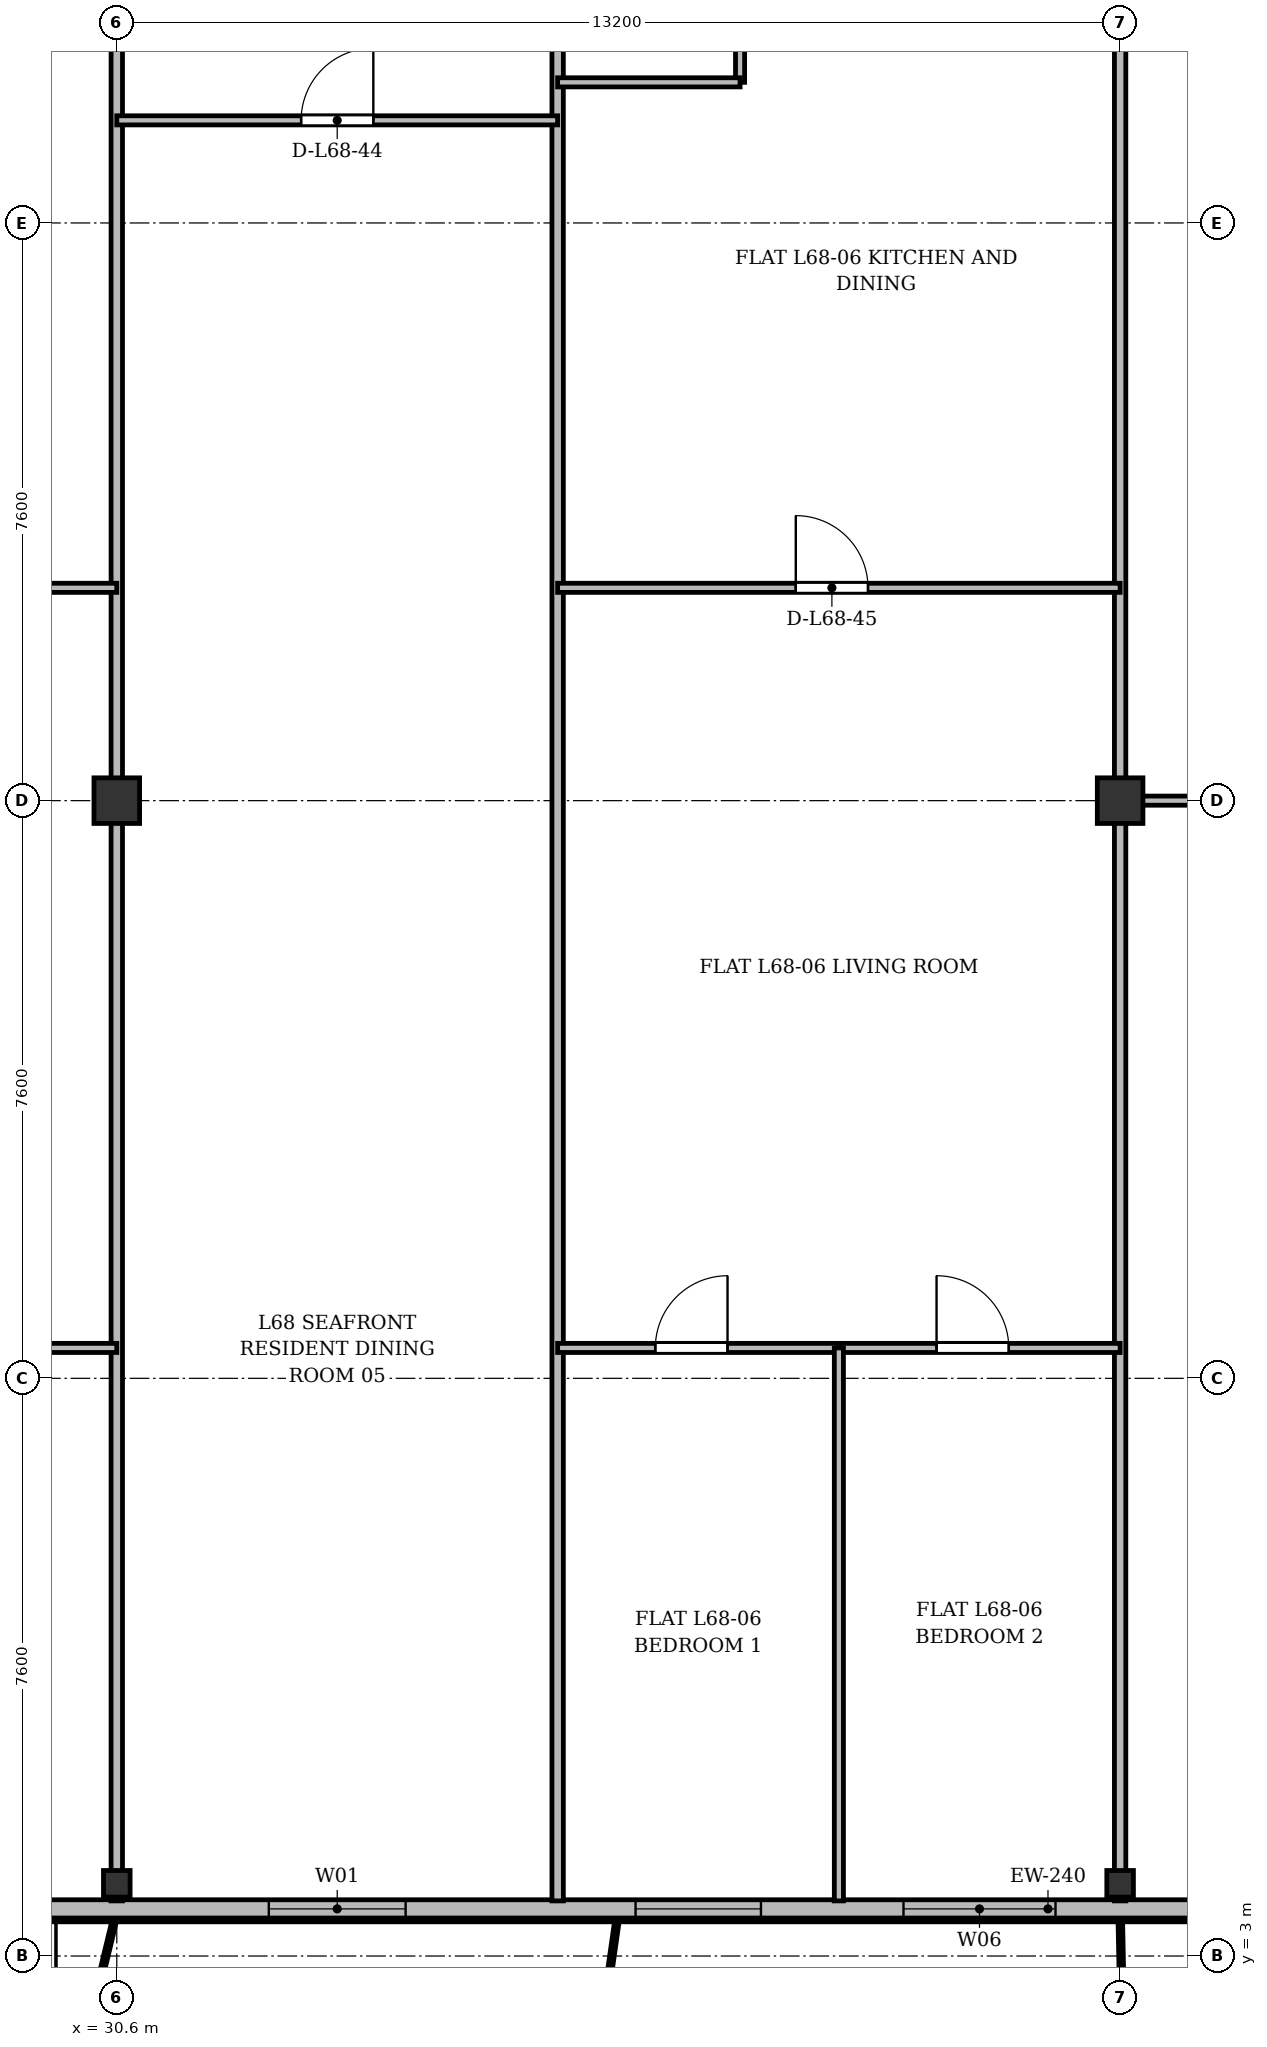
"""IFC4 building model, lengths in metres.
Left out: names, types, materials, properties, quantities, classifications, styles, units other than length and angle.
Written with IfcOpenShell. Run it as: python <this file> out.ifc"""

import sys

from ifc_helpers import new_model, si_unit, direction, frame, frame_2d, origin, origin_2d, place, context, subcontext, project, spatial, rectangle, i_section, extrude, source, transform, mapped, element, fill, save


model = new_model("IFC4")
c1 = context("Model", 3, precision=1e-05, world=origin(), true_north=direction((0.0, 1.0)))
c2 = subcontext(c1, "Body", "Model", "MODEL_VIEW")
j1 = project(units=[si_unit("LENGTHUNIT", "METRE"), si_unit("PLANEANGLEUNIT", "RADIAN")], contexts=[c1])
p1 = place(None, origin())
s1 = spatial("IfcSite", under=j1, at=p1, CompositionType="ELEMENT")
p2 = place(p1, origin())
s2 = spatial("IfcBuilding", under=s1, at=p2, CompositionType="ELEMENT")
p3 = place(p2, frame((0.0, 0.0, 263.1)))
s3 = spatial("IfcBuildingStorey", under=s2, at=p3, CompositionType="ELEMENT", Elevation=263.1)
m1 = source(origin(), c2, "Body", "SweptSolid", [
    extrude(i_section(OverallWidth=0.35, OverallDepth=0.35, WebThickness=0.018, FlangeThickness=0.028, at=origin_2d()), origin(), (0.0, 0.0, 1.0), 3.6),
])
p4 = place(p3, frame((30.6, 3.95, 0.0), z_axis=(0.0, 0.0, 1.0), x_axis=(1.0, 0.0, 0.0)))
e1 = element("IfcColumn", 1, at=p4, inside=s3, PredefinedType="COLUMN", context=c2, shape_type="MappedRepresentation", body=[
    mapped(m1, transform((0.0, 0.0, 0.0), x_axis=(1.0, 0.0, 0.0), y_axis=(0.0, 1.0, 0.0), z_axis=(0.0, 0.0, 1.0), scale=1.0)),
])
m2 = source(origin(), c2, "Body", "SweptSolid", [
    extrude(rectangle(XDim=0.6, YDim=0.6, at=origin_2d()), origin(), (0.0, 0.0, 1.0), 3.6),
])
p5 = place(p3, frame((30.6, 18.2, 0.0), z_axis=(0.0, 0.0, 1.0), x_axis=(1.0, 0.0, 0.0)))
e2 = element("IfcColumn", 2, at=p5, inside=s3, PredefinedType="COLUMN", context=c2, shape_type="MappedRepresentation", body=[
    mapped(m2, transform((0.0, 0.0, 0.0), x_axis=(1.0, 0.0, 0.0), y_axis=(0.0, 1.0, 0.0), z_axis=(0.0, 0.0, 1.0), scale=1.0)),
])
p6 = place(p3, frame((43.8, 3.95, 0.0), z_axis=(0.0, 0.0, 1.0), x_axis=(1.0, 0.0, 0.0)))
e3 = element("IfcColumn", 3, at=p6, inside=s3, PredefinedType="COLUMN", context=c2, shape_type="MappedRepresentation", body=[
    mapped(m1, transform((0.0, 0.0, 0.0), x_axis=(1.0, 0.0, 0.0), y_axis=(0.0, 1.0, 0.0), z_axis=(0.0, 0.0, 1.0), scale=1.0)),
])
p7 = place(p3, frame((43.8, 18.2, 0.0), z_axis=(0.0, 0.0, 1.0), x_axis=(1.0, 0.0, 0.0)))
e4 = element("IfcColumn", 4, at=p7, inside=s3, PredefinedType="COLUMN", context=c2, shape_type="MappedRepresentation", body=[
    mapped(m2, transform((0.0, 0.0, 0.0), x_axis=(1.0, 0.0, 0.0), y_axis=(0.0, 1.0, 0.0), z_axis=(0.0, 0.0, 1.0), scale=1.0)),
])
p8 = place(p3, frame((63.2, 3.62, 0.0), z_axis=(0.0, 0.0, 1.0), x_axis=(-1.0, 0.0, 0.0)))
e5 = element("IfcWall", 5, at=p8, inside=s3, PredefinedType="SOLIDWALL", context=c2, shape_type="SweptSolid", body=[
    extrude(rectangle(XDim=52.0, YDim=0.24, at=frame_2d((26.0, 0.0))), origin(), (0.0, 0.0, 1.0), 3.37),
])
p9 = place(p8, frame((0.345, 0.0, 0.9)))
e6 = element("IfcOpeningElement", 6, at=p9, cuts=e5, PredefinedType="OPENING", context=c2, shape_type="SweptSolid", body=[
    extrude(rectangle(XDim=1.2, YDim=1.65, at=frame_2d((0.6, 0.825))), frame((0.0, 0.13, 0.0), z_axis=(0.0, -1.0, 0.0), x_axis=(1.0, 0.0, 0.0)), (0.0, 0.0, 1.0), 0.26),
])
p10 = place(p8, frame((2.225, 0.0, 0.9)))
e7 = element("IfcOpeningElement", 7, at=p10, cuts=e5, PredefinedType="OPENING", context=c2, shape_type="SweptSolid", body=[
    extrude(rectangle(XDim=1.65, YDim=1.85, at=frame_2d((0.825, 0.925))), frame((0.0, 0.13, 0.0), z_axis=(0.0, -1.0, 0.0), x_axis=(1.0, 0.0, 0.0)), (0.0, 0.0, 1.0), 0.26),
])
p11 = place(p8, frame((5.42, 0.0, 0.0)))
e8 = element("IfcOpeningElement", 8, at=p11, cuts=e5, PredefinedType="OPENING", context=c2, shape_type="SweptSolid", body=[
    extrude(rectangle(XDim=1.2, YDim=2.2, at=frame_2d((0.6, 1.1))), frame((0.0, 0.13, 0.0), z_axis=(0.0, -1.0, 0.0), x_axis=(1.0, 0.0, 0.0)), (0.0, 0.0, 1.0), 0.26),
])
p12 = place(p8, frame((8.4, 0.0, 0.9)))
e9 = element("IfcOpeningElement", 9, at=p12, cuts=e5, PredefinedType="OPENING", context=c2, shape_type="SweptSolid", body=[
    extrude(rectangle(XDim=2.2, YDim=1.8, at=frame_2d((1.1, 0.9))), frame((0.0, 0.13, 0.0), z_axis=(0.0, -1.0, 0.0), x_axis=(1.0, 0.0, 0.0)), (0.0, 0.0, 1.0), 0.26),
])
p13 = place(p8, frame((15.05, 0.0, 0.9)))
e10 = element("IfcOpeningElement", 10, at=p13, cuts=e5, PredefinedType="OPENING", context=c2, shape_type="SweptSolid", body=[
    extrude(rectangle(XDim=1.5, YDim=1.75, at=frame_2d((0.75, 0.875))), frame((0.0, 0.13, 0.0), z_axis=(0.0, -1.0, 0.0), x_axis=(1.0, 0.0, 0.0)), (0.0, 0.0, 1.0), 0.26),
])
p14 = place(p8, frame((20.25, 0.0, 0.9)))
e11 = element("IfcOpeningElement", 11, at=p14, cuts=e5, PredefinedType="OPENING", context=c2, shape_type="SweptSolid", body=[
    extrude(rectangle(XDim=2.0, YDim=1.95, at=frame_2d((1.0, 0.975))), frame((0.0, 0.13, 0.0), z_axis=(0.0, -1.0, 0.0), x_axis=(1.0, 0.0, 0.0)), (0.0, 0.0, 1.0), 0.26),
])
p15 = place(p8, frame((24.125, 0.0, 0.9)))
e12 = element("IfcOpeningElement", 12, at=p15, cuts=e5, PredefinedType="OPENING", context=c2, shape_type="SweptSolid", body=[
    extrude(rectangle(XDim=1.65, YDim=1.85, at=frame_2d((0.825, 0.925))), frame((0.0, 0.13, 0.0), z_axis=(0.0, -1.0, 0.0), x_axis=(1.0, 0.0, 0.0)), (0.0, 0.0, 1.0), 0.26),
])
p16 = place(p8, frame((28.8, 0.0, 0.9)))
e13 = element("IfcOpeningElement", 13, at=p16, cuts=e5, PredefinedType="OPENING", context=c2, shape_type="SweptSolid", body=[
    extrude(rectangle(XDim=1.8, YDim=1.8, at=frame_2d((0.9, 0.9))), frame((0.0, 0.13, 0.0), z_axis=(0.0, -1.0, 0.0), x_axis=(1.0, 0.0, 0.0)), (0.0, 0.0, 1.0), 0.26),
])
p17 = place(p8, frame((34.078, 0.0, 0.0)))
e14 = element("IfcOpeningElement", 14, at=p17, cuts=e5, PredefinedType="OPENING", context=c2, shape_type="SweptSolid", body=[
    extrude(rectangle(XDim=1.2, YDim=2.2, at=frame_2d((0.6, 1.1))), frame((0.0, 0.13, 0.0), z_axis=(0.0, -1.0, 0.0), x_axis=(1.0, 0.0, 0.0)), (0.0, 0.0, 1.0), 0.26),
])
p18 = place(p8, frame((37.25, 0.0, 0.9)))
e15 = element("IfcOpeningElement", 15, at=p18, cuts=e5, PredefinedType="OPENING", context=c2, shape_type="SweptSolid", body=[
    extrude(rectangle(XDim=1.5, YDim=1.75, at=frame_2d((0.75, 0.875))), frame((0.0, 0.13, 0.0), z_axis=(0.0, -1.0, 0.0), x_axis=(1.0, 0.0, 0.0)), (0.0, 0.0, 1.0), 0.26),
])
p19 = place(p8, frame((40.9, 0.0, 0.9)))
e16 = element("IfcOpeningElement", 16, at=p19, cuts=e5, PredefinedType="OPENING", context=c2, shape_type="SweptSolid", body=[
    extrude(rectangle(XDim=2.0, YDim=1.95, at=frame_2d((1.0, 0.975))), frame((0.0, 0.13, 0.0), z_axis=(0.0, -1.0, 0.0), x_axis=(1.0, 0.0, 0.0)), (0.0, 0.0, 1.0), 0.26),
])
p20 = place(p8, frame((44.19, 0.0, 0.9)))
e17 = element("IfcOpeningElement", 17, at=p20, cuts=e5, PredefinedType="OPENING", context=c2, shape_type="SweptSolid", body=[
    extrude(rectangle(XDim=1.65, YDim=1.85, at=frame_2d((0.825, 0.925))), frame((0.0, 0.13, 0.0), z_axis=(0.0, -1.0, 0.0), x_axis=(1.0, 0.0, 0.0)), (0.0, 0.0, 1.0), 0.26),
])
p21 = place(p8, frame((49.855, 0.0, 0.9)))
e18 = element("IfcOpeningElement", 18, at=p21, cuts=e5, PredefinedType="OPENING", context=c2, shape_type="SweptSolid", body=[
    extrude(rectangle(XDim=1.8, YDim=1.8, at=frame_2d((0.9, 0.9))), frame((0.0, 0.13, 0.0), z_axis=(0.0, -1.0, 0.0), x_axis=(1.0, 0.0, 0.0)), (0.0, 0.0, 1.0), 0.26),
])
p22 = place(p3, frame((30.6, 3.725, 0.0), z_axis=(0.0, 0.0, 1.0), x_axis=(0.0, 1.0, 0.0)))
e19 = element("IfcWall", 19, at=p22, inside=s3, PredefinedType="PARTITIONING", context=c2, shape_type="SweptSolid", body=[
    extrude(rectangle(XDim=27.275, YDim=0.15, at=frame_2d((13.637, 0.0))), origin(), (0.0, 0.0, 1.0), 2.87),
])
p23 = place(p3, frame((36.4, 3.725, 0.0), z_axis=(0.0, 0.0, 1.0), x_axis=(0.0, 1.0, 0.0)))
e20 = element("IfcWall", 20, at=p23, inside=s3, PredefinedType="PARTITIONING", context=c2, shape_type="SweptSolid", body=[
    extrude(rectangle(XDim=27.275, YDim=0.15, at=frame_2d((13.637, 0.0))), origin(), (0.0, 0.0, 1.0), 2.92),
])
p24 = place(p3, frame((43.8, 3.725, 0.0), z_axis=(0.0, 0.0, 1.0), x_axis=(0.0, 1.0, 0.0)))
e21 = element("IfcWall", 21, at=p24, inside=s3, PredefinedType="PARTITIONING", context=c2, shape_type="SweptSolid", body=[
    extrude(rectangle(XDim=27.275, YDim=0.15, at=frame_2d((13.637, 0.0))), origin(), (0.0, 0.0, 1.0), 2.87),
])
p25 = place(p3, frame((23.4, 21.0, 0.0), z_axis=(0.0, 0.0, 1.0), x_axis=(1.0, 0.0, 0.0)))
e22 = element("IfcWall", 22, at=p25, inside=s3, PredefinedType="PARTITIONING", context=c2, shape_type="SweptSolid", body=[
    extrude(rectangle(XDim=7.2, YDim=0.12, at=frame_2d((3.6, 0.0))), origin(), (0.0, 0.0, 1.0), 2.87),
])
p26 = place(p25, frame((3.125, 0.0, 0.0)))
e23 = element("IfcOpeningElement", 23, at=p26, cuts=e22, PredefinedType="OPENING", context=c2, shape_type="SweptSolid", body=[
    extrude(rectangle(XDim=0.95, YDim=2.15, at=frame_2d((0.475, 1.075))), frame((0.0, 0.07, 0.0), z_axis=(0.0, -1.0, 0.0), x_axis=(1.0, 0.0, 0.0)), (0.0, 0.0, 1.0), 0.14),
])
p27 = place(p3, frame((27.0, 11.0, 0.0), z_axis=(0.0, 0.0, 1.0), x_axis=(1.0, 0.0, 0.0)))
e24 = element("IfcWall", 24, at=p27, inside=s3, PredefinedType="PARTITIONING", context=c2, shape_type="SweptSolid", body=[
    extrude(rectangle(XDim=3.6, YDim=0.12, at=frame_2d((1.8, 0.0))), origin(), (0.0, 0.0, 1.0), 2.87),
])
p28 = place(p27, frame((1.325, 0.0, 0.0)))
e25 = element("IfcOpeningElement", 25, at=p28, cuts=e24, PredefinedType="OPENING", context=c2, shape_type="SweptSolid", body=[
    extrude(rectangle(XDim=0.95, YDim=2.15, at=frame_2d((0.475, 1.075))), frame((0.0, 0.07, 0.0), z_axis=(0.0, -1.0, 0.0), x_axis=(1.0, 0.0, 0.0)), (0.0, 0.0, 1.0), 0.14),
])
p29 = place(p3, frame((30.6, 27.15, 0.0), z_axis=(0.0, 0.0, 1.0), x_axis=(1.0, 0.0, 0.0)))
e26 = element("IfcWall", 26, at=p29, inside=s3, PredefinedType="PARTITIONING", context=c2, shape_type="SweptSolid", body=[
    extrude(rectangle(XDim=5.8, YDim=0.12, at=frame_2d((2.9, 0.0))), origin(), (0.0, 0.0, 1.0), 2.87),
])
p30 = place(p29, frame((2.425, 0.0, 0.0)))
e27 = element("IfcOpeningElement", 27, at=p30, cuts=e26, PredefinedType="OPENING", context=c2, shape_type="SweptSolid", body=[
    extrude(rectangle(XDim=0.95, YDim=2.15, at=frame_2d((0.475, 1.075))), frame((0.0, 0.07, 0.0), z_axis=(0.0, -1.0, 0.0), x_axis=(1.0, 0.0, 0.0)), (0.0, 0.0, 1.0), 0.14),
])
p31 = place(p3, frame((36.4, 21.0, 0.0), z_axis=(0.0, 0.0, 1.0), x_axis=(1.0, 0.0, 0.0)))
e28 = element("IfcWall", 28, at=p31, inside=s3, PredefinedType="PARTITIONING", context=c2, shape_type="SweptSolid", body=[
    extrude(rectangle(XDim=7.4, YDim=0.12, at=frame_2d((3.7, 0.0))), origin(), (0.0, 0.0, 1.0), 2.87),
])
p32 = place(p31, frame((3.133, 0.0, 0.0)))
e29 = element("IfcOpeningElement", 29, at=p32, cuts=e28, PredefinedType="OPENING", context=c2, shape_type="SweptSolid", body=[
    extrude(rectangle(XDim=0.95, YDim=2.15, at=frame_2d((0.475, 1.075))), frame((0.0, 0.07, 0.0), z_axis=(0.0, -1.0, 0.0), x_axis=(1.0, 0.0, 0.0)), (0.0, 0.0, 1.0), 0.14),
])
p33 = place(p3, frame((38.8, 27.65, 0.0), z_axis=(0.0, 0.0, 1.0), x_axis=(0.0, 1.0, 0.0)))
e30 = element("IfcWall", 30, at=p33, inside=s3, PredefinedType="PARTITIONING", context=c2, shape_type="SweptSolid", body=[
    extrude(rectangle(XDim=3.35, YDim=0.12, at=frame_2d((1.675, 0.0))), origin(), (0.0, 0.0, 1.0), 3.37),
])
p34 = place(p33, frame((0.8, 0.0, 0.0)))
e31 = element("IfcOpeningElement", 31, at=p34, cuts=e30, PredefinedType="OPENING", context=c2, shape_type="SweptSolid", body=[
    extrude(rectangle(XDim=0.85, YDim=2.1, at=frame_2d((0.425, 1.05))), frame((0.0, 0.07, 0.0), z_axis=(0.0, -1.0, 0.0), x_axis=(1.0, 0.0, 0.0)), (0.0, 0.0, 1.0), 0.14),
])
p35 = place(p3, frame((36.4, 27.65, 0.0), z_axis=(0.0, 0.0, 1.0), x_axis=(1.0, 0.0, 0.0)))
e32 = element("IfcWall", 32, at=p35, inside=s3, PredefinedType="PARTITIONING", context=c2, shape_type="SweptSolid", body=[
    extrude(rectangle(XDim=2.4, YDim=0.12, at=frame_2d((1.2, 0.0))), origin(), (0.0, 0.0, 1.0), 3.37),
])
p36 = place(p3, frame((36.4, 11.0, 0.0), z_axis=(0.0, 0.0, 1.0), x_axis=(1.0, 0.0, 0.0)))
e33 = element("IfcWall", 33, at=p36, inside=s3, PredefinedType="PARTITIONING", context=c2, shape_type="SweptSolid", body=[
    extrude(rectangle(XDim=3.7, YDim=0.12, at=frame_2d((1.85, 0.0))), origin(), (0.0, 0.0, 1.0), 3.37),
])
p37 = place(p36, frame((1.285, 0.0, 0.0)))
e34 = element("IfcOpeningElement", 34, at=p37, cuts=e33, PredefinedType="OPENING", context=c2, shape_type="SweptSolid", body=[
    extrude(rectangle(XDim=0.95, YDim=2.15, at=frame_2d((0.475, 1.075))), frame((0.0, 0.07, 0.0), z_axis=(0.0, -1.0, 0.0), x_axis=(1.0, 0.0, 0.0)), (0.0, 0.0, 1.0), 0.14),
])
p38 = place(p3, frame((40.1, 11.0, 0.0), z_axis=(0.0, 0.0, 1.0), x_axis=(1.0, 0.0, 0.0)))
e35 = element("IfcWall", 35, at=p38, inside=s3, PredefinedType="PARTITIONING", context=c2, shape_type="SweptSolid", body=[
    extrude(rectangle(XDim=3.7, YDim=0.12, at=frame_2d((1.85, 0.0))), origin(), (0.0, 0.0, 1.0), 2.87),
])
p39 = place(p38, frame((1.285, 0.0, 0.0)))
e36 = element("IfcOpeningElement", 36, at=p39, cuts=e35, PredefinedType="OPENING", context=c2, shape_type="SweptSolid", body=[
    extrude(rectangle(XDim=0.95, YDim=2.15, at=frame_2d((0.475, 1.075))), frame((0.0, 0.07, 0.0), z_axis=(0.0, -1.0, 0.0), x_axis=(1.0, 0.0, 0.0)), (0.0, 0.0, 1.0), 0.14),
])
p40 = place(p3, frame((40.1, 3.725, 0.0), z_axis=(0.0, 0.0, 1.0), x_axis=(0.0, 1.0, 0.0)))
e37 = element("IfcWall", 37, at=p40, inside=s3, PredefinedType="PARTITIONING", context=c2, shape_type="SweptSolid", body=[
    extrude(rectangle(XDim=7.275, YDim=0.12, at=frame_2d((3.637, 0.0))), origin(), (0.0, 0.0, 1.0), 2.92),
])
p41 = place(p3, frame((43.8, 18.2, 0.0), z_axis=(0.0, 0.0, 1.0), x_axis=(1.0, 0.0, 0.0)))
e38 = element("IfcWall", 38, at=p41, inside=s3, PredefinedType="PARTITIONING", context=c2, shape_type="SweptSolid", body=[
    extrude(rectangle(XDim=7.2, YDim=0.12, at=frame_2d((3.6, 0.0))), origin(), (0.0, 0.0, 1.0), 2.92),
])
p42 = place(p41, frame((3.125, 0.0, 0.0)))
e39 = element("IfcOpeningElement", 39, at=p42, cuts=e38, PredefinedType="OPENING", context=c2, shape_type="SweptSolid", body=[
    extrude(rectangle(XDim=0.95, YDim=2.15, at=frame_2d((0.475, 1.075))), frame((0.0, 0.07, 0.0), z_axis=(0.0, -1.0, 0.0), x_axis=(1.0, 0.0, 0.0)), (0.0, 0.0, 1.0), 0.14),
])
m3 = source(origin(), c2, "Body", "SweptSolid", [
    extrude(rectangle(XDim=2.0, YDim=1.95, at=frame_2d((1.0, 0.975))), frame((0.0, 0.03, 0.0), z_axis=(0.0, -1.0, 0.0), x_axis=(1.0, 0.0, 0.0)), (0.0, 0.0, 1.0), 0.06),
])
p43 = place(p14, origin())
e40 = element("IfcWindow", 40, at=p43, inside=s3, PartitioningType="SINGLE_PANEL", PredefinedType="WINDOW", context=c2, shape_type="MappedRepresentation", body=[
    mapped(m3, transform((0.0, 0.0, 0.0), x_axis=(1.0, 0.0, 0.0), y_axis=(0.0, 1.0, 0.0), z_axis=(0.0, 0.0, 1.0), scale=1.0)),
])
fill(e11, e40)
m4 = source(origin(), c2, "Body", "SweptSolid", [
    extrude(rectangle(XDim=1.65, YDim=1.85, at=frame_2d((0.825, 0.925))), frame((0.0, 0.03, 0.0), z_axis=(0.0, -1.0, 0.0), x_axis=(1.0, 0.0, 0.0)), (0.0, 0.0, 1.0), 0.06),
])
p44 = place(p15, origin())
e41 = element("IfcWindow", 41, at=p44, inside=s3, PartitioningType="SINGLE_PANEL", PredefinedType="WINDOW", context=c2, shape_type="MappedRepresentation", body=[
    mapped(m4, transform((0.0, 0.0, 0.0), x_axis=(1.0, 0.0, 0.0), y_axis=(0.0, 1.0, 0.0), z_axis=(0.0, 0.0, 1.0), scale=1.0)),
])
fill(e12, e41)
m5 = source(origin(), c2, "Body", "SweptSolid", [
    extrude(rectangle(XDim=1.8, YDim=1.8, at=frame_2d((0.9, 0.9))), frame((0.0, 0.03, 0.0), z_axis=(0.0, -1.0, 0.0), x_axis=(1.0, 0.0, 0.0)), (0.0, 0.0, 1.0), 0.06),
])
p45 = place(p16, origin())
e42 = element("IfcWindow", 42, at=p45, inside=s3, PartitioningType="SINGLE_PANEL", PredefinedType="WINDOW", context=c2, shape_type="MappedRepresentation", body=[
    mapped(m5, transform((0.0, 0.0, 0.0), x_axis=(1.0, 0.0, 0.0), y_axis=(0.0, 1.0, 0.0), z_axis=(0.0, 0.0, 1.0), scale=1.0)),
])
fill(e13, e42)
m6 = source(origin(), c2, "Body", "SweptSolid", [
    extrude(rectangle(XDim=0.95, YDim=2.15, at=frame_2d((0.475, 1.075))), frame((0.0, 0.025, 0.0), z_axis=(0.0, -1.0, 0.0), x_axis=(1.0, 0.0, 0.0)), (0.0, 0.0, 1.0), 0.05),
])
p46 = place(p30, origin())
e43 = element("IfcDoor", 43, at=p46, inside=s3, OperationType="SINGLE_SWING_RIGHT", PredefinedType="DOOR", context=c2, shape_type="MappedRepresentation", body=[
    mapped(m6, transform((0.0, 0.0, 0.0), x_axis=(1.0, 0.0, 0.0), y_axis=(0.0, 1.0, 0.0), z_axis=(0.0, 0.0, 1.0), scale=1.0)),
])
fill(e27, e43)
p47 = place(p32, origin())
e44 = element("IfcDoor", 44, at=p47, inside=s3, OperationType="SINGLE_SWING_LEFT", PredefinedType="DOOR", context=c2, shape_type="MappedRepresentation", body=[
    mapped(m6, transform((0.0, 0.0, 0.0), x_axis=(1.0, 0.0, 0.0), y_axis=(0.0, 1.0, 0.0), z_axis=(0.0, 0.0, 1.0), scale=1.0)),
])
fill(e29, e44)
p48 = place(p37, origin())
e45 = element("IfcDoor", 45, at=p48, inside=s3, OperationType="SINGLE_SWING_RIGHT", PredefinedType="DOOR", context=c2, shape_type="MappedRepresentation", body=[
    mapped(m6, transform((0.0, 0.0, 0.0), x_axis=(1.0, 0.0, 0.0), y_axis=(0.0, 1.0, 0.0), z_axis=(0.0, 0.0, 1.0), scale=1.0)),
])
fill(e34, e45)
p49 = place(p39, origin())
e46 = element("IfcDoor", 46, at=p49, inside=s3, OperationType="SINGLE_SWING_LEFT", PredefinedType="DOOR", context=c2, shape_type="MappedRepresentation", body=[
    mapped(m6, transform((0.0, 0.0, 0.0), x_axis=(1.0, 0.0, 0.0), y_axis=(0.0, 1.0, 0.0), z_axis=(0.0, 0.0, 1.0), scale=1.0)),
])
fill(e36, e46)
save(model, sys.argv[1])
